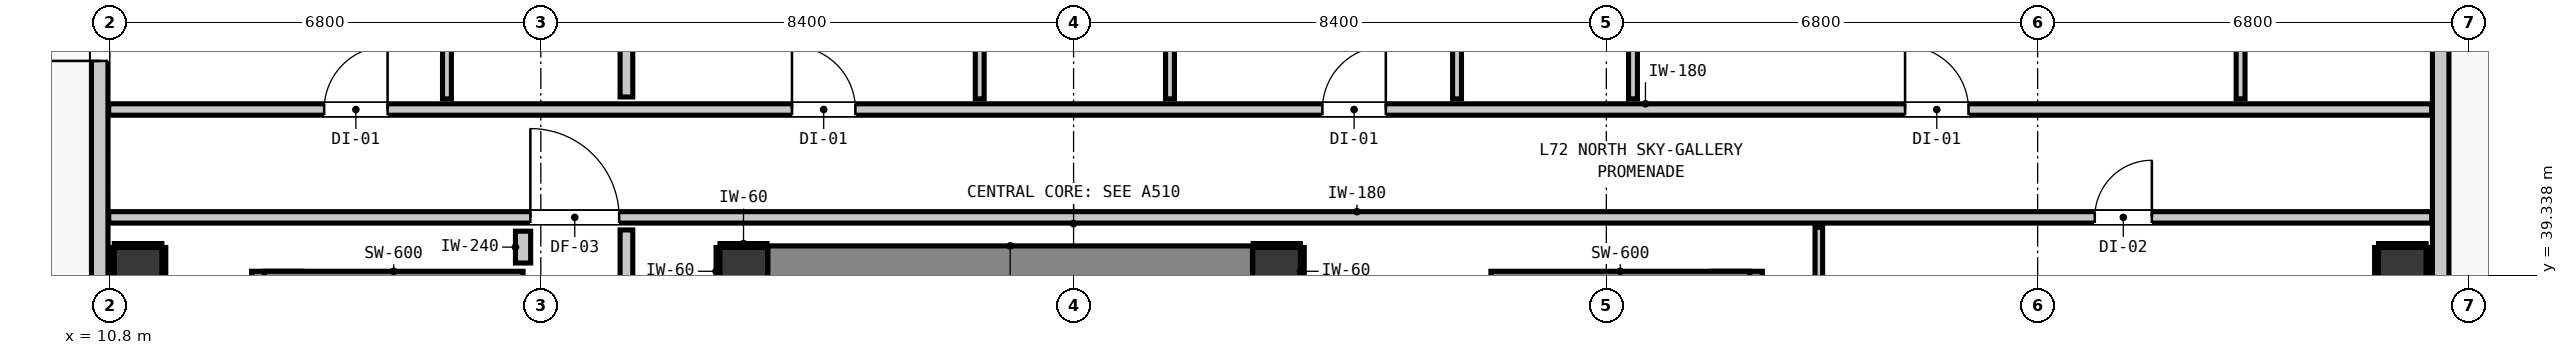
"""IFC4 building model, lengths in metres.
Left out: names, types, materials, properties, quantities, classifications, styles, units other than length and angle.
Written with IfcOpenShell. Run it as: python <this file> out.ifc"""

import sys

from ifc_helpers import new_model, si_unit, direction, frame, frame_2d, origin, origin_2d, place, context, subcontext, project, spatial, rectangle, extrude, element, fill, save


model = new_model("IFC4")
c1 = context("Model", 3, precision=1e-05, world=origin(), true_north=direction((0.0, 1.0)))
c2 = subcontext(c1, "Body", "Model", "MODEL_VIEW")
j1 = project(units=[si_unit("LENGTHUNIT", "METRE"), si_unit("PLANEANGLEUNIT", "RADIAN")], contexts=[c1])
p1 = place(None, origin())
s1 = spatial("IfcSite", under=j1, at=p1, CompositionType="ELEMENT")
p2 = place(p1, origin())
s2 = spatial("IfcBuilding", under=s1, at=p2, CompositionType="ELEMENT")
p3 = place(p2, frame((0.0, 0.0, 247.88)))
s3 = spatial("IfcBuildingStorey", under=s2, at=p3, CompositionType="ELEMENT", Elevation=247.88)
for number, where, z_axis, x_axis in (
    (1, (20.8, 39.4, 0.0), (0.0, 0.0, 1.0), (1.0, 0.0, 0.0)),
    (2, (29.2, 39.4, 0.0), (0.0, 0.0, 1.0), (1.0, 0.0, 0.0)),
):
    element("IfcColumn", number, at=place(p3, frame(where, z_axis=z_axis, x_axis=x_axis)), inside=s3, PredefinedType="COLUMN", context=c2, shape_type="SweptSolid", body=[
        extrude(rectangle(XDim=0.75, YDim=0.75, at=origin_2d()), origin(), (0.0, 0.0, 1.0), 3.32),
    ])
p4 = place(p3, frame((13.44, 31.08, 0.0), z_axis=(0.0, 0.0, 1.0), x_axis=(0.0, 1.0, 0.0)))
e3 = element("IfcWall", 3, at=p4, inside=s3, PredefinedType="SHEAR", context=c2, shape_type="SweptSolid", body=[
    extrude(rectangle(XDim=8.32, YDim=0.8, at=frame_2d((4.16, 0.0))), origin(), (0.0, 0.0, 1.0), 3.32),
])
p5 = place(p3, frame((13.24, 39.1, 0.0), z_axis=(0.0, 0.0, 1.0), x_axis=(1.0, 0.0, 0.0)))
e4 = element("IfcWall", 4, at=p5, inside=s3, PredefinedType="SHEAR", context=c2, shape_type="SweptSolid", body=[
    extrude(rectangle(XDim=4.08, YDim=0.6, at=frame_2d((2.04, 0.0))), origin(), (0.0, 0.0, 1.0), 3.32),
])
p6 = place(p3, frame((36.46, 31.08, 0.0), z_axis=(0.0, 0.0, 1.0), x_axis=(0.0, 1.0, 0.0)))
e5 = element("IfcWall", 5, at=p6, inside=s3, PredefinedType="SHEAR", context=c2, shape_type="SweptSolid", body=[
    extrude(rectangle(XDim=8.32, YDim=0.8, at=frame_2d((4.16, 0.0))), origin(), (0.0, 0.0, 1.0), 3.32),
])
p7 = place(p3, frame((32.58, 39.1, 0.0), z_axis=(0.0, 0.0, 1.0), x_axis=(1.0, 0.0, 0.0)))
e6 = element("IfcWall", 6, at=p7, inside=s3, PredefinedType="SHEAR", context=c2, shape_type="SweptSolid", body=[
    extrude(rectangle(XDim=4.08, YDim=0.6, at=frame_2d((2.04, 0.0))), origin(), (0.0, 0.0, 1.0), 3.32),
])
p8 = place(p3, frame((21.18, 39.4, 0.0), z_axis=(0.0, 0.0, 1.0), x_axis=(1.0, 0.0, 0.0)))
e7 = element("IfcWall", 7, at=p8, inside=s3, PredefinedType="SHEAR", context=c2, shape_type="SweptSolid", body=[
    extrude(rectangle(XDim=7.64, YDim=0.8, at=frame_2d((3.82, 0.0))), origin(), (0.0, 0.0, 1.0), 3.32),
])
for number, where, z_axis, x_axis in (
    (8, (11.25, 39.4, 0.0), (0.0, 0.0, 1.0), (1.0, 0.0, 0.0)),
    (9, (46.95, 39.4, 0.0), (0.0, 0.0, 1.0), (1.0, 0.0, 0.0)),
):
    element("IfcColumn", number, at=place(p3, frame(where, z_axis=z_axis, x_axis=x_axis)), inside=s3, PredefinedType="COLUMN", context=c2, shape_type="SweptSolid", body=[
        extrude(rectangle(XDim=0.75, YDim=0.75, at=origin_2d()), origin(), (0.0, 0.0, 1.0), 2.9),
    ])
p9 = place(p3, frame((10.645, 18.545, 0.0), z_axis=(0.0, 0.0, 1.0), x_axis=(0.0, 1.0, 0.0)))
e10 = element("IfcWall", 10, at=p9, inside=s3, PredefinedType="STANDARD", context=c2, shape_type="SweptSolid", body=[
    extrude(rectangle(XDim=30.31, YDim=0.26, at=frame_2d((15.155, 0.0))), origin(), (0.0, 0.0, 1.0), 2.9),
])
p10 = place(p9, frame((24.171, 0.0, 0.0)))
e11 = element("IfcOpeningElement", 11, at=p10, cuts=e10, PredefinedType="OPENING", context=c2, shape_type="SweptSolid", body=[
    extrude(rectangle(XDim=1.0, YDim=2.15, at=frame_2d((0.5, 1.075))), frame((0.0, 0.14, 0.0), z_axis=(0.0, -1.0, 0.0), x_axis=(1.0, 0.0, 0.0)), (0.0, 0.0, 1.0), 0.28),
])
p11 = place(p9, frame((27.045, 0.0, 0.85)))
e12 = element("IfcOpeningElement", 12, at=p11, cuts=e10, PredefinedType="OPENING", context=c2, shape_type="SweptSolid", body=[
    extrude(rectangle(XDim=1.5, YDim=1.8, at=frame_2d((0.75, 0.9))), frame((0.0, 0.14, 0.0), z_axis=(0.0, -1.0, 0.0), x_axis=(1.0, 0.0, 0.0)), (0.0, 0.0, 1.0), 0.28),
])
p12 = place(p3, frame((47.555, 48.855, 0.0), z_axis=(0.0, 0.0, 1.0), x_axis=(0.0, -1.0, 0.0)))
e13 = element("IfcWall", 13, at=p12, inside=s3, PredefinedType="STANDARD", context=c2, shape_type="SweptSolid", body=[
    extrude(rectangle(XDim=30.31, YDim=0.26, at=frame_2d((15.155, 0.0))), origin(), (0.0, 0.0, 1.0), 2.9),
])
p13 = place(p12, frame((3.729, 0.0, 0.0)))
e14 = element("IfcOpeningElement", 14, at=p13, cuts=e13, PredefinedType="OPENING", context=c2, shape_type="SweptSolid", body=[
    extrude(rectangle(XDim=1.0, YDim=2.15, at=frame_2d((0.5, 1.075))), frame((0.0, 0.14, 0.0), z_axis=(0.0, -1.0, 0.0), x_axis=(1.0, 0.0, 0.0)), (0.0, 0.0, 1.0), 0.28),
])
p14 = place(p3, frame((10.787, 40.25, 0.0), z_axis=(0.0, 0.0, 1.0), x_axis=(1.0, 0.0, 0.0)))
e15 = element("IfcWall", 15, at=p14, inside=s3, PredefinedType="PARTITIONING", context=c2, shape_type="SweptSolid", body=[
    extrude(rectangle(XDim=36.626, YDim=0.18, at=frame_2d((18.313, 0.0))), origin(), (0.0, 0.0, 1.0), 2.9),
])
p15 = place(p14, frame((6.648, 0.0, 0.0)))
e16 = element("IfcOpeningElement", 16, at=p15, cuts=e15, PredefinedType="OPENING", context=c2, shape_type="SweptSolid", body=[
    extrude(rectangle(XDim=1.4, YDim=2.15, at=frame_2d((0.7, 1.075))), frame((0.0, 0.1, 0.0), z_axis=(0.0, -1.0, 0.0), x_axis=(1.0, 0.0, 0.0)), (0.0, 0.0, 1.0), 0.2),
])
p16 = place(p14, frame((31.314, 0.0, 0.0)))
e17 = element("IfcOpeningElement", 17, at=p16, cuts=e15, PredefinedType="OPENING", context=c2, shape_type="SweptSolid", body=[
    extrude(rectangle(XDim=0.9, YDim=2.1, at=frame_2d((0.45, 1.05))), frame((0.0, 0.1, 0.0), z_axis=(0.0, -1.0, 0.0), x_axis=(1.0, 0.0, 0.0)), (0.0, 0.0, 1.0), 0.2),
])
p17 = place(p3, frame((10.787, 41.95, 0.0), z_axis=(0.0, 0.0, 1.0), x_axis=(1.0, 0.0, 0.0)))
e18 = element("IfcWall", 18, at=p17, inside=s3, PredefinedType="PARTITIONING", context=c2, shape_type="SweptSolid", body=[
    extrude(rectangle(XDim=36.626, YDim=0.18, at=frame_2d((18.313, 0.0))), origin(), (0.0, 0.0, 1.0), 2.9),
])
p18 = place(p17, frame((3.397, 0.0, 0.0)))
e19 = element("IfcOpeningElement", 19, at=p18, cuts=e18, PredefinedType="OPENING", context=c2, shape_type="SweptSolid", body=[
    extrude(rectangle(XDim=1.0, YDim=2.15, at=frame_2d((0.5, 1.075))), frame((0.0, 0.1, 0.0), z_axis=(0.0, -1.0, 0.0), x_axis=(1.0, 0.0, 0.0)), (0.0, 0.0, 1.0), 0.2),
])
p19 = place(p17, frame((10.773, 0.0, 0.0)))
e20 = element("IfcOpeningElement", 20, at=p19, cuts=e18, PredefinedType="OPENING", context=c2, shape_type="SweptSolid", body=[
    extrude(rectangle(XDim=1.0, YDim=2.15, at=frame_2d((0.5, 1.075))), frame((0.0, 0.1, 0.0), z_axis=(0.0, -1.0, 0.0), x_axis=(1.0, 0.0, 0.0)), (0.0, 0.0, 1.0), 0.2),
])
p20 = place(p17, frame((19.136, 0.0, 0.0)))
e21 = element("IfcOpeningElement", 21, at=p20, cuts=e18, PredefinedType="OPENING", context=c2, shape_type="SweptSolid", body=[
    extrude(rectangle(XDim=1.0, YDim=2.15, at=frame_2d((0.5, 1.075))), frame((0.0, 0.1, 0.0), z_axis=(0.0, -1.0, 0.0), x_axis=(1.0, 0.0, 0.0)), (0.0, 0.0, 1.0), 0.2),
])
p21 = place(p17, frame((28.323, 0.0, 0.0)))
e22 = element("IfcOpeningElement", 22, at=p21, cuts=e18, PredefinedType="OPENING", context=c2, shape_type="SweptSolid", body=[
    extrude(rectangle(XDim=1.0, YDim=2.15, at=frame_2d((0.5, 1.075))), frame((0.0, 0.1, 0.0), z_axis=(0.0, -1.0, 0.0), x_axis=(1.0, 0.0, 0.0)), (0.0, 0.0, 1.0), 0.2),
])
p22 = place(p3, frame((17.32, 39.53, 0.0), z_axis=(0.0, 0.0, 1.0), x_axis=(0.0, 1.0, 0.0)))
e23 = element("IfcWall", 23, at=p22, inside=s3, PredefinedType="PARTITIONING", context=c2, shape_type="SweptSolid", body=[
    extrude(rectangle(XDim=0.502, YDim=0.24, at=frame_2d((0.251, 0.0))), origin(), (0.0, 0.0, 1.0), 2.9),
])
p23 = place(p3, frame((18.95, 38.918, 0.0), z_axis=(0.0, 0.0, 1.0), x_axis=(0.0, 1.0, 0.0)))
e24 = element("IfcWall", 24, at=p23, inside=s3, PredefinedType="PARTITIONING", context=c2, shape_type="SweptSolid", body=[
    extrude(rectangle(XDim=1.134, YDim=0.2, at=frame_2d((0.567, 0.0))), origin(), (0.0, 0.0, 1.0), 2.9),
])
p24 = place(p3, frame((18.95, 42.148, 0.0), z_axis=(0.0, 0.0, 1.0), x_axis=(0.0, 1.0, 0.0)))
e25 = element("IfcWall", 25, at=p24, inside=s3, PredefinedType="PARTITIONING", context=c2, shape_type="SweptSolid", body=[
    extrude(rectangle(XDim=3.43, YDim=0.2, at=frame_2d((1.715, 0.0))), origin(), (0.0, 0.0, 1.0), 2.9),
])
p25 = place(p3, frame((16.12, 42.118, 0.0), z_axis=(0.0, 0.0, 1.0), x_axis=(0.0, 1.0, 0.0)))
e26 = element("IfcWall", 26, at=p25, inside=s3, PredefinedType="PARTITIONING", context=c2, shape_type="SweptSolid", body=[
    extrude(rectangle(XDim=3.49, YDim=0.14, at=frame_2d((1.745, 0.0))), origin(), (0.0, 0.0, 1.0), 2.9),
])
p26 = place(p25, frame((1.298, 0.0, 0.0)))
e27 = element("IfcOpeningElement", 27, at=p26, cuts=e26, PredefinedType="OPENING", context=c2, shape_type="SweptSolid", body=[
    extrude(rectangle(XDim=0.9, YDim=2.1, at=frame_2d((0.45, 1.05))), frame((0.0, 0.08, 0.0), z_axis=(0.0, -1.0, 0.0), x_axis=(1.0, 0.0, 0.0)), (0.0, 0.0, 1.0), 0.16),
])
p27 = place(p3, frame((24.52, 42.118, 0.0), z_axis=(0.0, 0.0, 1.0), x_axis=(0.0, 1.0, 0.0)))
e28 = element("IfcWall", 28, at=p27, inside=s3, PredefinedType="PARTITIONING", context=c2, shape_type="SweptSolid", body=[
    extrude(rectangle(XDim=3.49, YDim=0.14, at=frame_2d((1.745, 0.0))), origin(), (0.0, 0.0, 1.0), 2.9),
])
p28 = place(p27, frame((1.298, 0.0, 0.0)))
e29 = element("IfcOpeningElement", 29, at=p28, cuts=e28, PredefinedType="OPENING", context=c2, shape_type="SweptSolid", body=[
    extrude(rectangle(XDim=0.9, YDim=2.1, at=frame_2d((0.45, 1.05))), frame((0.0, 0.08, 0.0), z_axis=(0.0, -1.0, 0.0), x_axis=(1.0, 0.0, 0.0)), (0.0, 0.0, 1.0), 0.16),
])
p29 = place(p3, frame((27.52, 42.118, 0.0), z_axis=(0.0, 0.0, 1.0), x_axis=(0.0, 1.0, 0.0)))
e30 = element("IfcWall", 30, at=p29, inside=s3, PredefinedType="PARTITIONING", context=c2, shape_type="SweptSolid", body=[
    extrude(rectangle(XDim=3.49, YDim=0.14, at=frame_2d((1.745, 0.0))), origin(), (0.0, 0.0, 1.0), 2.9),
])
p30 = place(p3, frame((32.046, 42.118, 0.0), z_axis=(0.0, 0.0, 1.0), x_axis=(0.0, 1.0, 0.0)))
e31 = element("IfcWall", 31, at=p30, inside=s3, PredefinedType="PARTITIONING", context=c2, shape_type="SweptSolid", body=[
    extrude(rectangle(XDim=3.49, YDim=0.14, at=frame_2d((1.745, 0.0))), origin(), (0.0, 0.0, 1.0), 2.9),
])
p31 = place(p30, frame((1.298, 0.0, 0.0)))
e32 = element("IfcOpeningElement", 32, at=p31, cuts=e31, PredefinedType="OPENING", context=c2, shape_type="SweptSolid", body=[
    extrude(rectangle(XDim=0.9, YDim=2.1, at=frame_2d((0.45, 1.05))), frame((0.0, 0.08, 0.0), z_axis=(0.0, -1.0, 0.0), x_axis=(1.0, 0.0, 0.0)), (0.0, 0.0, 1.0), 0.16),
])
p32 = place(p3, frame((34.82, 42.118, 0.0), z_axis=(0.0, 0.0, 1.0), x_axis=(0.0, 1.0, 0.0)))
e33 = element("IfcWall", 33, at=p32, inside=s3, PredefinedType="PARTITIONING", context=c2, shape_type="SweptSolid", body=[
    extrude(rectangle(XDim=3.49, YDim=0.14, at=frame_2d((1.745, 0.0))), origin(), (0.0, 0.0, 1.0), 2.9),
])
p33 = place(p3, frame((44.4, 42.118, 0.0), z_axis=(0.0, 0.0, 1.0), x_axis=(0.0, 1.0, 0.0)))
e34 = element("IfcWall", 34, at=p33, inside=s3, PredefinedType="PARTITIONING", context=c2, shape_type="SweptSolid", body=[
    extrude(rectangle(XDim=3.49, YDim=0.14, at=frame_2d((1.745, 0.0))), origin(), (0.0, 0.0, 1.0), 2.9),
])
p34 = place(p33, frame((1.285, 0.0, 0.0)))
e35 = element("IfcOpeningElement", 35, at=p34, cuts=e34, PredefinedType="OPENING", context=c2, shape_type="SweptSolid", body=[
    extrude(rectangle(XDim=0.9, YDim=2.1, at=frame_2d((0.45, 1.05))), frame((0.0, 0.08, 0.0), z_axis=(0.0, -1.0, 0.0), x_axis=(1.0, 0.0, 0.0)), (0.0, 0.0, 1.0), 0.16),
])
p35 = place(p3, frame((37.75, 32.138, 0.0), z_axis=(0.0, 0.0, 1.0), x_axis=(0.0, 1.0, 0.0)))
e36 = element("IfcWall", 36, at=p35, inside=s3, PredefinedType="PARTITIONING", context=c2, shape_type="SweptSolid", body=[
    extrude(rectangle(XDim=7.954, YDim=0.12, at=frame_2d((3.977, 0.0))), origin(), (0.0, 0.0, 1.0), 2.9),
])
p36 = place(p3, frame((20.425, 39.807, 0.0), z_axis=(0.0, 0.0, 1.0), x_axis=(1.0, 0.0, 0.0)))
e37 = element("IfcWall", 37, at=p36, inside=s3, PredefinedType="PARTITIONING", context=c2, shape_type="SweptSolid", body=[
    extrude(rectangle(XDim=0.742, YDim=0.06, at=frame_2d((0.371, 0.0))), origin(), (0.0, 0.0, 1.0), 0.905),
])
p37 = place(p3, frame((20.393, 39.025, 0.0), z_axis=(0.0, 0.0, 1.0), x_axis=(0.0, 1.0, 0.0)))
e38 = element("IfcWall", 38, at=p37, inside=s3, PredefinedType="PARTITIONING", context=c2, shape_type="SweptSolid", body=[
    extrude(rectangle(XDim=0.75, YDim=0.06, at=frame_2d((0.375, 0.0))), origin(), (0.0, 0.0, 1.0), 0.905),
])
p38 = place(p3, frame((28.833, 39.807, 0.0), z_axis=(0.0, 0.0, 1.0), x_axis=(1.0, 0.0, 0.0)))
e39 = element("IfcWall", 39, at=p38, inside=s3, PredefinedType="PARTITIONING", context=c2, shape_type="SweptSolid", body=[
    extrude(rectangle(XDim=0.742, YDim=0.06, at=frame_2d((0.371, 0.0))), origin(), (0.0, 0.0, 1.0), 0.905),
])
for number, where, z_axis, x_axis in (
    (40, (29.607, 39.025, 0.0), (0.0, 0.0, 1.0), (0.0, 1.0, 0.0)),
    (41, (10.875, 39.807, 0.0), (0.0, 0.0, 1.0), (1.0, 0.0, 0.0)),
):
    element("IfcWall", number, at=place(p3, frame(where, z_axis=z_axis, x_axis=x_axis)), inside=s3, PredefinedType="PARTITIONING", context=c2, shape_type="SweptSolid", body=[
        extrude(rectangle(XDim=0.75, YDim=0.06, at=frame_2d((0.375, 0.0))), origin(), (0.0, 0.0, 1.0), 0.905),
    ])
for number, where, z_axis, x_axis in (
    (42, (10.843, 39.025, 0.0), (0.0, 0.0, 1.0), (0.0, 1.0, 0.0)),
    (43, (11.657, 39.025, 0.0), (0.0, 0.0, 1.0), (0.0, 1.0, 0.0)),
):
    element("IfcWall", number, at=place(p3, frame(where, z_axis=z_axis, x_axis=x_axis)), inside=s3, PredefinedType="PARTITIONING", context=c2, shape_type="SweptSolid", body=[
        extrude(rectangle(XDim=0.75, YDim=0.06, at=frame_2d((0.375, 0.0))), origin(), (0.0, 0.0, 1.0), 1.45),
    ])
p39 = place(p3, frame((46.575, 39.807, 0.0), z_axis=(0.0, 0.0, 1.0), x_axis=(1.0, 0.0, 0.0)))
e44 = element("IfcWall", 44, at=p39, inside=s3, PredefinedType="PARTITIONING", context=c2, shape_type="SweptSolid", body=[
    extrude(rectangle(XDim=0.75, YDim=0.06, at=frame_2d((0.375, 0.0))), origin(), (0.0, 0.0, 1.0), 0.905),
])
for number, where, z_axis, x_axis in (
    (45, (46.543, 39.025, 0.0), (0.0, 0.0, 1.0), (0.0, 1.0, 0.0)),
    (46, (47.357, 39.025, 0.0), (0.0, 0.0, 1.0), (0.0, 1.0, 0.0)),
):
    element("IfcWall", number, at=place(p3, frame(where, z_axis=z_axis, x_axis=x_axis)), inside=s3, PredefinedType="PARTITIONING", context=c2, shape_type="SweptSolid", body=[
        extrude(rectangle(XDim=0.75, YDim=0.06, at=frame_2d((0.375, 0.0))), origin(), (0.0, 0.0, 1.0), 1.45),
    ])
p40 = place(p10, origin())
e47 = element("IfcDoor", 47, at=p40, inside=s3, OperationType="SINGLE_SWING_LEFT", PredefinedType="DOOR", context=c2, shape_type="SweptSolid", body=[
    extrude(rectangle(XDim=1.0, YDim=2.15, at=frame_2d((0.5, 1.075))), frame((0.0, 0.025, 0.0), z_axis=(0.0, -1.0, 0.0), x_axis=(1.0, 0.0, 0.0)), (0.0, 0.0, 1.0), 0.05),
])
fill(e11, e47)
p41 = place(p15, origin())
e48 = element("IfcDoor", 48, at=p41, inside=s3, OperationType="SINGLE_SWING_LEFT", PredefinedType="DOOR", context=c2, shape_type="SweptSolid", body=[
    extrude(rectangle(XDim=1.4, YDim=2.15, at=frame_2d((0.7, 1.075))), frame((0.0, 0.025, 0.0), z_axis=(0.0, -1.0, 0.0), x_axis=(1.0, 0.0, 0.0)), (0.0, 0.0, 1.0), 0.05),
])
fill(e16, e48)
p42 = place(p18, origin())
e49 = element("IfcDoor", 49, at=p42, inside=s3, OperationType="SINGLE_SWING_RIGHT", PredefinedType="DOOR", context=c2, shape_type="SweptSolid", body=[
    extrude(rectangle(XDim=1.0, YDim=2.15, at=frame_2d((0.5, 1.075))), frame((0.0, 0.025, 0.0), z_axis=(0.0, -1.0, 0.0), x_axis=(1.0, 0.0, 0.0)), (0.0, 0.0, 1.0), 0.05),
])
fill(e19, e49)
p43 = place(p19, origin())
e50 = element("IfcDoor", 50, at=p43, inside=s3, OperationType="SINGLE_SWING_LEFT", PredefinedType="DOOR", context=c2, shape_type="SweptSolid", body=[
    extrude(rectangle(XDim=1.0, YDim=2.15, at=frame_2d((0.5, 1.075))), frame((0.0, 0.025, 0.0), z_axis=(0.0, -1.0, 0.0), x_axis=(1.0, 0.0, 0.0)), (0.0, 0.0, 1.0), 0.05),
])
fill(e20, e50)
p44 = place(p20, origin())
e51 = element("IfcDoor", 51, at=p44, inside=s3, OperationType="SINGLE_SWING_RIGHT", PredefinedType="DOOR", context=c2, shape_type="SweptSolid", body=[
    extrude(rectangle(XDim=1.0, YDim=2.15, at=frame_2d((0.5, 1.075))), frame((0.0, 0.025, 0.0), z_axis=(0.0, -1.0, 0.0), x_axis=(1.0, 0.0, 0.0)), (0.0, 0.0, 1.0), 0.05),
])
fill(e21, e51)
p45 = place(p21, origin())
e52 = element("IfcDoor", 52, at=p45, inside=s3, OperationType="SINGLE_SWING_LEFT", PredefinedType="DOOR", context=c2, shape_type="SweptSolid", body=[
    extrude(rectangle(XDim=1.0, YDim=2.15, at=frame_2d((0.5, 1.075))), frame((0.0, 0.025, 0.0), z_axis=(0.0, -1.0, 0.0), x_axis=(1.0, 0.0, 0.0)), (0.0, 0.0, 1.0), 0.05),
])
fill(e22, e52)
p46 = place(p16, origin())
e53 = element("IfcDoor", 53, at=p46, inside=s3, OperationType="SINGLE_SWING_RIGHT", PredefinedType="DOOR", context=c2, shape_type="SweptSolid", body=[
    extrude(rectangle(XDim=0.9, YDim=2.1, at=frame_2d((0.45, 1.05))), frame((0.0, 0.025, 0.0), z_axis=(0.0, -1.0, 0.0), x_axis=(1.0, 0.0, 0.0)), (0.0, 0.0, 1.0), 0.05),
])
fill(e17, e53)
save(model, sys.argv[1])
